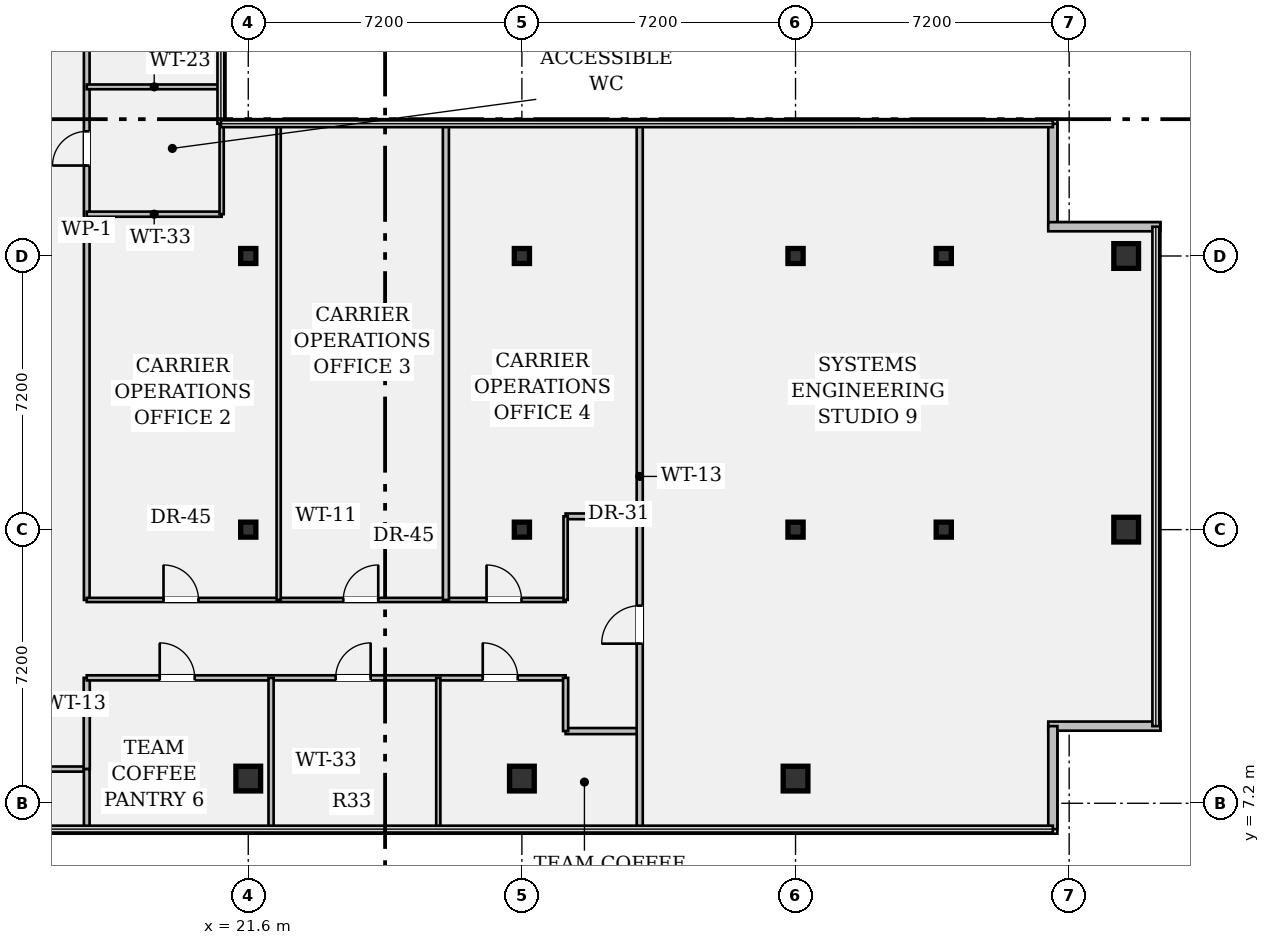
"""IFC4 building model, lengths in metres.
Left out: names, types, materials, properties, quantities, classifications, styles, units other than length and angle.
Written with IfcOpenShell. Run it as: python <this file> out.ifc"""

import sys

from ifc_helpers import new_model, si_unit, direction, frame, frame_2d, origin, origin_2d, place, context, subcontext, project, spatial, rectangle, hollow_rectangle, i_section, extrude, element, fill, save


model = new_model("IFC4")
c1 = context("Model", 3, precision=1e-05, world=origin(), true_north=direction((0.0, 1.0)))
c2 = subcontext(c1, "Body", "Model", "MODEL_VIEW")
j1 = project(units=[si_unit("LENGTHUNIT", "METRE"), si_unit("PLANEANGLEUNIT", "RADIAN")], contexts=[c1])
p1 = place(None, origin())
s1 = spatial("IfcSite", under=j1, at=p1, CompositionType="ELEMENT")
p2 = place(p1, origin())
s2 = spatial("IfcBuilding", under=s1, at=p2, CompositionType="ELEMENT")
p3 = place(p2, frame((0.0, 0.0, 286.65)))
s3 = spatial("IfcBuildingStorey", under=s2, at=p3, CompositionType="ELEMENT", Elevation=286.65)
p4 = place(p3, frame((21.6, 7.85, 0.0), z_axis=(0.0, 0.0, 1.0), x_axis=(1.0, 0.0, 0.0)))
e1 = element("IfcColumn", 1, at=p4, inside=s3, PredefinedType="COLUMN", context=c2, shape_type="SweptSolid", body=[
    extrude(hollow_rectangle(XDim=0.65, YDim=0.65, WallThickness=0.04, at=origin_2d()), origin(), (0.0, 0.0, 1.0), 3.24),
])
for number, where, z_axis, x_axis in (
    (2, (21.6, 14.4, 0.0), (0.0, 0.0, 1.0), (1.0, 0.0, 0.0)),
    (3, (21.6, 21.6, 0.0), (0.0, 0.0, 1.0), (1.0, 0.0, 0.0)),
):
    element("IfcColumn", number, at=place(p3, frame(where, z_axis=z_axis, x_axis=x_axis)), inside=s3, PredefinedType="COLUMN", context=c2, shape_type="SweptSolid", body=[
        extrude(i_section(OverallWidth=0.399, OverallDepth=0.394, WebThickness=0.023, FlangeThickness=0.037, FilletRadius=0.018, at=origin_2d()), origin(), (0.0, 0.0, 1.0), 3.24),
    ])
p5 = place(p3, frame((28.8, 7.85, 0.0), z_axis=(0.0, 0.0, 1.0), x_axis=(1.0, 0.0, 0.0)))
e4 = element("IfcColumn", 4, at=p5, inside=s3, PredefinedType="COLUMN", context=c2, shape_type="SweptSolid", body=[
    extrude(hollow_rectangle(XDim=0.65, YDim=0.65, WallThickness=0.04, at=origin_2d()), origin(), (0.0, 0.0, 1.0), 3.24),
])
for number, where, z_axis, x_axis in (
    (5, (28.8, 14.4, 0.0), (0.0, 0.0, 1.0), (1.0, 0.0, 0.0)),
    (6, (28.8, 21.6, 0.0), (0.0, 0.0, 1.0), (1.0, 0.0, 0.0)),
):
    element("IfcColumn", number, at=place(p3, frame(where, z_axis=z_axis, x_axis=x_axis)), inside=s3, PredefinedType="COLUMN", context=c2, shape_type="SweptSolid", body=[
        extrude(i_section(OverallWidth=0.399, OverallDepth=0.394, WebThickness=0.023, FlangeThickness=0.037, FilletRadius=0.018, at=origin_2d()), origin(), (0.0, 0.0, 1.0), 3.24),
    ])
p6 = place(p3, frame((36.0, 7.85, 0.0), z_axis=(0.0, 0.0, 1.0), x_axis=(1.0, 0.0, 0.0)))
e7 = element("IfcColumn", 7, at=p6, inside=s3, PredefinedType="COLUMN", context=c2, shape_type="SweptSolid", body=[
    extrude(hollow_rectangle(XDim=0.65, YDim=0.65, WallThickness=0.04, at=origin_2d()), origin(), (0.0, 0.0, 1.0), 3.24),
])
for number, where, z_axis, x_axis in (
    (8, (36.0, 14.4, 0.0), (0.0, 0.0, 1.0), (1.0, 0.0, 0.0)),
    (9, (36.0, 21.6, 0.0), (0.0, 0.0, 1.0), (1.0, 0.0, 0.0)),
    (10, (39.9, 14.4, 0.0), (0.0, 0.0, 1.0), (1.0, 0.0, 0.0)),
    (11, (39.9, 21.6, 0.0), (0.0, 0.0, 1.0), (1.0, 0.0, 0.0)),
):
    element("IfcColumn", number, at=place(p3, frame(where, z_axis=z_axis, x_axis=x_axis)), inside=s3, PredefinedType="COLUMN", context=c2, shape_type="SweptSolid", body=[
        extrude(i_section(OverallWidth=0.399, OverallDepth=0.394, WebThickness=0.023, FlangeThickness=0.037, FilletRadius=0.018, at=origin_2d()), origin(), (0.0, 0.0, 1.0), 3.24),
    ])
for number, where, z_axis, x_axis in (
    (12, (44.7, 14.4, 0.0), (0.0, 0.0, 1.0), (1.0, 0.0, 0.0)),
    (13, (44.7, 21.6, 0.0), (0.0, 0.0, 1.0), (1.0, 0.0, 0.0)),
):
    element("IfcColumn", number, at=place(p3, frame(where, z_axis=z_axis, x_axis=x_axis)), inside=s3, PredefinedType="COLUMN", context=c2, shape_type="SweptSolid", body=[
        extrude(hollow_rectangle(XDim=0.65, YDim=0.65, WallThickness=0.04, at=origin_2d()), origin(), (0.0, 0.0, 1.0), 3.24),
    ])
p7 = place(p3, frame((42.77, 25.08, 0.0), z_axis=(0.0, 0.0, 1.0), x_axis=(0.0, -1.0, 0.0)))
e14 = element("IfcWall", 14, at=p7, inside=s3, PredefinedType="STANDARD", context=c2, shape_type="SweptSolid", body=[
    extrude(rectangle(XDim=2.71, YDim=0.24, at=frame_2d((1.355, 0.0))), origin(), (0.0, 0.0, 1.0), 3.24),
])
for number, where, z_axis, x_axis in (
    (15, (42.65, 22.37, 0.0), (0.0, 0.0, 1.0), (1.0, 0.0, 0.0)),
    (16, (45.6, 9.23, 0.0), (0.0, 0.0, 1.0), (-1.0, 0.0, 0.0)),
):
    element("IfcWall", number, at=place(p3, frame(where, z_axis=z_axis, x_axis=x_axis)), inside=s3, PredefinedType="STANDARD", context=c2, shape_type="SweptSolid", body=[
        extrude(rectangle(XDim=2.95, YDim=0.24, at=frame_2d((1.475, 0.0))), origin(), (0.0, 0.0, 1.0), 3.24),
    ])
p8 = place(p3, frame((42.77, 9.23, 0.0), z_axis=(0.0, 0.0, 1.0), x_axis=(0.0, -1.0, 0.0)))
e17 = element("IfcWall", 17, at=p8, inside=s3, PredefinedType="STANDARD", context=c2, shape_type="SweptSolid", body=[
    extrude(rectangle(XDim=2.71, YDim=0.24, at=frame_2d((1.355, 0.0))), origin(), (0.0, 0.0, 1.0), 3.24),
])
p9 = place(p3, frame((14.4, 8.1, 0.0), z_axis=(0.0, 0.0, 1.0), x_axis=(1.0, 0.0, 0.0)))
e18 = element("IfcWall", 18, at=p9, inside=s3, PredefinedType="PARTITIONING", context=c2, shape_type="SweptSolid", body=[
    extrude(rectangle(XDim=2.95, YDim=0.135, at=frame_2d((1.475, 0.0))), origin(), (0.0, 0.0, 1.0), 3.24),
])
p10 = place(p9, frame((0.95, 0.0, 0.0)))
e19 = element("IfcOpeningElement", 19, at=p10, cuts=e18, PredefinedType="OPENING", context=c2, shape_type="SweptSolid", body=[
    extrude(rectangle(XDim=0.92, YDim=2.15, at=frame_2d((0.46, 1.075))), frame((0.0, 0.08, 0.0), z_axis=(0.0, -1.0, 0.0), x_axis=(1.0, 0.0, 0.0)), (0.0, 0.0, 1.0), 0.159),
])
p11 = place(p3, frame((17.35, 8.1, 0.0), z_axis=(0.0, 0.0, 1.0), x_axis=(0.0, 1.0, 0.0)))
e20 = element("IfcWall", 20, at=p11, inside=s3, PredefinedType="PARTITIONING", context=c2, shape_type="SweptSolid", body=[
    extrude(rectangle(XDim=2.4, YDim=0.16, at=frame_2d((1.2, 0.0))), origin(), (0.0, 0.0, 1.0), 3.24),
])
p12 = place(p3, frame((17.35, 12.55, 0.0), z_axis=(0.0, 0.0, 1.0), x_axis=(0.0, 1.0, 0.0)))
e21 = element("IfcWall", 21, at=p12, inside=s3, PredefinedType="PARTITIONING", context=c2, shape_type="SweptSolid", body=[
    extrude(rectangle(XDim=22.65, YDim=0.15, at=frame_2d((11.325, 0.0))), origin(), (0.0, 0.0, 1.0), 2.676),
])
p13 = place(p12, frame((11.43, 0.0, 0.0)))
e22 = element("IfcOpeningElement", 22, at=p13, cuts=e21, PredefinedType="OPENING", context=c2, shape_type="SweptSolid", body=[
    extrude(rectangle(XDim=0.9, YDim=2.15, at=frame_2d((0.45, 1.075))), frame((0.0, 0.087, 0.0), z_axis=(0.0, -1.0, 0.0), x_axis=(1.0, 0.0, 0.0)), (0.0, 0.0, 1.0), 0.174),
])
p14 = place(p12, frame((14.68, 0.0, 0.0)))
e23 = element("IfcOpeningElement", 23, at=p14, cuts=e21, PredefinedType="OPENING", context=c2, shape_type="SweptSolid", body=[
    extrude(rectangle(XDim=0.9, YDim=2.15, at=frame_2d((0.45, 1.075))), frame((0.0, 0.087, 0.0), z_axis=(0.0, -1.0, 0.0), x_axis=(1.0, 0.0, 0.0)), (0.0, 0.0, 1.0), 0.174),
])
p15 = place(p12, frame((17.93, 0.0, 0.0)))
e24 = element("IfcOpeningElement", 24, at=p15, cuts=e21, PredefinedType="OPENING", context=c2, shape_type="SweptSolid", body=[
    extrude(rectangle(XDim=0.9, YDim=2.15, at=frame_2d((0.45, 1.075))), frame((0.0, 0.087, 0.0), z_axis=(0.0, -1.0, 0.0), x_axis=(1.0, 0.0, 0.0)), (0.0, 0.0, 1.0), 0.174),
])
p16 = place(p12, frame((21.17, 0.0, 0.0)))
e25 = element("IfcOpeningElement", 25, at=p16, cuts=e21, PredefinedType="OPENING", context=c2, shape_type="SweptSolid", body=[
    extrude(rectangle(XDim=0.9, YDim=2.15, at=frame_2d((0.45, 1.075))), frame((0.0, 0.087, 0.0), z_axis=(0.0, -1.0, 0.0), x_axis=(1.0, 0.0, 0.0)), (0.0, 0.0, 1.0), 0.174),
])
p17 = place(p3, frame((17.35, 10.5, 0.0), z_axis=(0.0, 0.0, 1.0), x_axis=(1.0, 0.0, 0.0)))
e26 = element("IfcWall", 26, at=p17, inside=s3, PredefinedType="PARTITIONING", context=c2, shape_type="SweptSolid", body=[
    extrude(rectangle(XDim=12.6, YDim=0.135, at=frame_2d((6.3, 0.0))), origin(), (0.0, 0.0, 1.0), 2.676),
])
p18 = place(p17, frame((1.92, 0.0, 0.0)))
e27 = element("IfcOpeningElement", 27, at=p18, cuts=e26, PredefinedType="OPENING", context=c2, shape_type="SweptSolid", body=[
    extrude(rectangle(XDim=0.92, YDim=2.15, at=frame_2d((0.46, 1.075))), frame((0.0, 0.08, 0.0), z_axis=(0.0, -1.0, 0.0), x_axis=(1.0, 0.0, 0.0)), (0.0, 0.0, 1.0), 0.159),
])
p19 = place(p17, frame((6.55, 0.0, 0.0)))
e28 = element("IfcOpeningElement", 28, at=p19, cuts=e26, PredefinedType="OPENING", context=c2, shape_type="SweptSolid", body=[
    extrude(rectangle(XDim=0.92, YDim=2.15, at=frame_2d((0.46, 1.075))), frame((0.0, 0.08, 0.0), z_axis=(0.0, -1.0, 0.0), x_axis=(1.0, 0.0, 0.0)), (0.0, 0.0, 1.0), 0.159),
])
p20 = place(p17, frame((10.42, 0.0, 0.0)))
e29 = element("IfcOpeningElement", 29, at=p20, cuts=e26, PredefinedType="OPENING", context=c2, shape_type="SweptSolid", body=[
    extrude(rectangle(XDim=0.92, YDim=2.15, at=frame_2d((0.46, 1.075))), frame((0.0, 0.08, 0.0), z_axis=(0.0, -1.0, 0.0), x_axis=(1.0, 0.0, 0.0)), (0.0, 0.0, 1.0), 0.159),
])
p21 = place(p3, frame((17.35, 12.55, 0.0), z_axis=(0.0, 0.0, 1.0), x_axis=(1.0, 0.0, 0.0)))
e30 = element("IfcWall", 30, at=p21, inside=s3, PredefinedType="PARTITIONING", context=c2, shape_type="SweptSolid", body=[
    extrude(rectangle(XDim=12.6, YDim=0.11, at=frame_2d((6.3, 0.0))), origin(), (0.0, 0.0, 1.0), 2.676),
])
p22 = place(p21, frame((2.02, 0.0, 0.0)))
e31 = element("IfcOpeningElement", 31, at=p22, cuts=e30, PredefinedType="OPENING", context=c2, shape_type="SweptSolid", body=[
    extrude(rectangle(XDim=0.92, YDim=2.15, at=frame_2d((0.46, 1.075))), frame((0.0, 0.067, 0.0), z_axis=(0.0, -1.0, 0.0), x_axis=(1.0, 0.0, 0.0)), (0.0, 0.0, 1.0), 0.134),
])
p23 = place(p21, frame((6.75, 0.0, 0.0)))
e32 = element("IfcOpeningElement", 32, at=p23, cuts=e30, PredefinedType="OPENING", context=c2, shape_type="SweptSolid", body=[
    extrude(rectangle(XDim=0.92, YDim=2.15, at=frame_2d((0.46, 1.075))), frame((0.0, 0.067, 0.0), z_axis=(0.0, -1.0, 0.0), x_axis=(1.0, 0.0, 0.0)), (0.0, 0.0, 1.0), 0.134),
])
p24 = place(p21, frame((10.52, 0.0, 0.0)))
e33 = element("IfcOpeningElement", 33, at=p24, cuts=e30, PredefinedType="OPENING", context=c2, shape_type="SweptSolid", body=[
    extrude(rectangle(XDim=0.92, YDim=2.15, at=frame_2d((0.46, 1.075))), frame((0.0, 0.067, 0.0), z_axis=(0.0, -1.0, 0.0), x_axis=(1.0, 0.0, 0.0)), (0.0, 0.0, 1.0), 0.134),
])
p25 = place(p3, frame((29.95, 9.1, 0.0), z_axis=(0.0, 0.0, 1.0), x_axis=(1.0, 0.0, 0.0)))
e34 = element("IfcWall", 34, at=p25, inside=s3, PredefinedType="PARTITIONING", context=c2, shape_type="SweptSolid", body=[
    extrude(rectangle(XDim=1.95, YDim=0.16, at=frame_2d((0.975, 0.0))), origin(), (0.0, 0.0, 1.0), 2.808),
])
p26 = place(p3, frame((29.95, 14.75, 0.0), z_axis=(0.0, 0.0, 1.0), x_axis=(1.0, 0.0, 0.0)))
e35 = element("IfcWall", 35, at=p26, inside=s3, PredefinedType="PARTITIONING", context=c2, shape_type="SweptSolid", body=[
    extrude(rectangle(XDim=1.95, YDim=0.15, at=frame_2d((0.975, 0.0))), origin(), (0.0, 0.0, 1.0), 2.808),
])
p27 = place(p3, frame((29.95, 9.1, 0.0), z_axis=(0.0, 0.0, 1.0), x_axis=(0.0, 1.0, 0.0)))
e36 = element("IfcWall", 36, at=p27, inside=s3, PredefinedType="PARTITIONING", context=c2, shape_type="SweptSolid", body=[
    extrude(rectangle(XDim=1.4, YDim=0.135, at=frame_2d((0.7, 0.0))), origin(), (0.0, 0.0, 1.0), 3.24),
])
p28 = place(p3, frame((29.95, 12.55, 0.0), z_axis=(0.0, 0.0, 1.0), x_axis=(0.0, 1.0, 0.0)))
e37 = element("IfcWall", 37, at=p28, inside=s3, PredefinedType="PARTITIONING", context=c2, shape_type="SweptSolid", body=[
    extrude(rectangle(XDim=2.2, YDim=0.11, at=frame_2d((1.1, 0.0))), origin(), (0.0, 0.0, 1.0), 2.676),
])
p29 = place(p3, frame((31.9, 6.52, 0.0), z_axis=(0.0, 0.0, 1.0), x_axis=(0.0, 1.0, 0.0)))
e38 = element("IfcWall", 38, at=p29, inside=s3, PredefinedType="PARTITIONING", context=c2, shape_type="SweptSolid", body=[
    extrude(rectangle(XDim=18.56, YDim=0.16, at=frame_2d((9.28, 0.0))), origin(), (0.0, 0.0, 1.0), 2.676),
])
p30 = place(p29, frame((4.88, 0.0, 0.0)))
e39 = element("IfcOpeningElement", 39, at=p30, cuts=e38, PredefinedType="OPENING", context=c2, shape_type="SweptSolid", body=[
    extrude(rectangle(XDim=1.0, YDim=2.15, at=frame_2d((0.5, 1.075))), frame((0.0, 0.092, 0.0), z_axis=(0.0, -1.0, 0.0), x_axis=(1.0, 0.0, 0.0)), (0.0, 0.0, 1.0), 0.184),
])
p31 = place(p3, frame((17.35, 22.7, 0.0), z_axis=(0.0, 0.0, 1.0), x_axis=(1.0, 0.0, 0.0)))
e40 = element("IfcWall", 40, at=p31, inside=s3, PredefinedType="PARTITIONING", context=c2, shape_type="SweptSolid", body=[
    extrude(rectangle(XDim=3.55, YDim=0.135, at=frame_2d((1.775, 0.0))), origin(), (0.0, 0.0, 1.0), 2.808),
])
p32 = place(p3, frame((20.9, 22.7, 0.0), z_axis=(0.0, 0.0, 1.0), x_axis=(0.0, 1.0, 0.0)))
e41 = element("IfcWall", 41, at=p32, inside=s3, PredefinedType="PARTITIONING", context=c2, shape_type="SweptSolid", body=[
    extrude(rectangle(XDim=12.5, YDim=0.11, at=frame_2d((6.25, 0.0))), origin(), (0.0, 0.0, 1.0), 3.24),
])
p33 = place(p3, frame((17.35, 26.05, 0.0), z_axis=(0.0, 0.0, 1.0), x_axis=(1.0, 0.0, 0.0)))
e42 = element("IfcWall", 42, at=p33, inside=s3, PredefinedType="PARTITIONING", context=c2, shape_type="SweptSolid", body=[
    extrude(rectangle(XDim=3.55, YDim=0.125, at=frame_2d((1.775, 0.0))), origin(), (0.0, 0.0, 1.0), 2.808),
])
p34 = place(p3, frame((22.4, 12.55, 0.0), z_axis=(0.0, 0.0, 1.0), x_axis=(0.0, 1.0, 0.0)))
e43 = element("IfcWall", 43, at=p34, inside=s3, PredefinedType="PARTITIONING", context=c2, shape_type="SweptSolid", body=[
    extrude(rectangle(XDim=12.5, YDim=0.11, at=frame_2d((6.25, 0.0))), origin(), (0.0, 0.0, 1.0), 2.676),
])
p35 = place(p3, frame((26.8, 12.55, 0.0), z_axis=(0.0, 0.0, 1.0), x_axis=(0.0, 1.0, 0.0)))
e44 = element("IfcWall", 44, at=p35, inside=s3, PredefinedType="PARTITIONING", context=c2, shape_type="SweptSolid", body=[
    extrude(rectangle(XDim=12.5, YDim=0.16, at=frame_2d((6.25, 0.0))), origin(), (0.0, 0.0, 1.0), 2.676),
])
p36 = place(p3, frame((17.35, 6.52, 0.0), z_axis=(0.0, 0.0, 1.0), x_axis=(0.0, 1.0, 0.0)))
e45 = element("IfcWall", 45, at=p36, inside=s3, PredefinedType="PARTITIONING", context=c2, shape_type="SweptSolid", body=[
    extrude(rectangle(XDim=1.58, YDim=0.15, at=frame_2d((0.79, 0.0))), origin(), (0.0, 0.0, 1.0), 3.24),
])
p37 = place(p3, frame((22.2, 6.52, 0.0), z_axis=(0.0, 0.0, 1.0), x_axis=(0.0, 1.0, 0.0)))
e46 = element("IfcWall", 46, at=p37, inside=s3, PredefinedType="PARTITIONING", context=c2, shape_type="SweptSolid", body=[
    extrude(rectangle(XDim=3.98, YDim=0.135, at=frame_2d((1.99, 0.0))), origin(), (0.0, 0.0, 1.0), 2.676),
])
p38 = place(p3, frame((26.6, 6.52, 0.0), z_axis=(0.0, 0.0, 1.0), x_axis=(0.0, 1.0, 0.0)))
e47 = element("IfcWall", 47, at=p38, inside=s3, PredefinedType="PARTITIONING", context=c2, shape_type="SweptSolid", body=[
    extrude(rectangle(XDim=3.98, YDim=0.11, at=frame_2d((1.99, 0.0))), origin(), (0.0, 0.0, 1.0), 2.676),
])
p39 = place(p13, origin())
e48 = element("IfcDoor", 48, at=p39, inside=s3, OperationType="SINGLE_SWING_LEFT", PredefinedType="DOOR", context=c2, shape_type="SweptSolid", body=[
    extrude(rectangle(XDim=0.9, YDim=2.15, at=frame_2d((0.45, 1.075))), frame((0.0, 0.025, 0.0), z_axis=(0.0, -1.0, 0.0), x_axis=(1.0, 0.0, 0.0)), (0.0, 0.0, 1.0), 0.05),
])
fill(e22, e48)
p40 = place(p22, origin())
e49 = element("IfcDoor", 49, at=p40, inside=s3, OperationType="SINGLE_SWING_LEFT", PredefinedType="DOOR", context=c2, shape_type="SweptSolid", body=[
    extrude(rectangle(XDim=0.92, YDim=2.15, at=frame_2d((0.46, 1.075))), frame((0.0, 0.025, 0.0), z_axis=(0.0, -1.0, 0.0), x_axis=(1.0, 0.0, 0.0)), (0.0, 0.0, 1.0), 0.05),
])
fill(e31, e49)
p41 = place(p23, origin())
e50 = element("IfcDoor", 50, at=p41, inside=s3, OperationType="SINGLE_SWING_RIGHT", PredefinedType="DOOR", context=c2, shape_type="SweptSolid", body=[
    extrude(rectangle(XDim=0.92, YDim=2.15, at=frame_2d((0.46, 1.075))), frame((0.0, 0.025, 0.0), z_axis=(0.0, -1.0, 0.0), x_axis=(1.0, 0.0, 0.0)), (0.0, 0.0, 1.0), 0.05),
])
fill(e32, e50)
p42 = place(p24, origin())
e51 = element("IfcDoor", 51, at=p42, inside=s3, OperationType="SINGLE_SWING_LEFT", PredefinedType="DOOR", context=c2, shape_type="SweptSolid", body=[
    extrude(rectangle(XDim=0.92, YDim=2.15, at=frame_2d((0.46, 1.075))), frame((0.0, 0.025, 0.0), z_axis=(0.0, -1.0, 0.0), x_axis=(1.0, 0.0, 0.0)), (0.0, 0.0, 1.0), 0.05),
])
fill(e33, e51)
p43 = place(p18, origin())
e52 = element("IfcDoor", 52, at=p43, inside=s3, OperationType="SINGLE_SWING_LEFT", PredefinedType="DOOR", context=c2, shape_type="SweptSolid", body=[
    extrude(rectangle(XDim=0.92, YDim=2.15, at=frame_2d((0.46, 1.075))), frame((0.0, 0.025, 0.0), z_axis=(0.0, -1.0, 0.0), x_axis=(1.0, 0.0, 0.0)), (0.0, 0.0, 1.0), 0.05),
])
fill(e27, e52)
p44 = place(p19, origin())
e53 = element("IfcDoor", 53, at=p44, inside=s3, OperationType="SINGLE_SWING_RIGHT", PredefinedType="DOOR", context=c2, shape_type="SweptSolid", body=[
    extrude(rectangle(XDim=0.92, YDim=2.15, at=frame_2d((0.46, 1.075))), frame((0.0, 0.025, 0.0), z_axis=(0.0, -1.0, 0.0), x_axis=(1.0, 0.0, 0.0)), (0.0, 0.0, 1.0), 0.05),
])
fill(e28, e53)
p45 = place(p20, origin())
e54 = element("IfcDoor", 54, at=p45, inside=s3, OperationType="SINGLE_SWING_LEFT", PredefinedType="DOOR", context=c2, shape_type="SweptSolid", body=[
    extrude(rectangle(XDim=0.92, YDim=2.15, at=frame_2d((0.46, 1.075))), frame((0.0, 0.025, 0.0), z_axis=(0.0, -1.0, 0.0), x_axis=(1.0, 0.0, 0.0)), (0.0, 0.0, 1.0), 0.05),
])
fill(e29, e54)
p46 = place(p30, origin())
e55 = element("IfcDoor", 55, at=p46, inside=s3, OperationType="SINGLE_SWING_LEFT", PredefinedType="DOOR", context=c2, shape_type="SweptSolid", body=[
    extrude(rectangle(XDim=1.0, YDim=2.15, at=frame_2d((0.5, 1.075))), frame((0.0, 0.025, 0.0), z_axis=(0.0, -1.0, 0.0), x_axis=(1.0, 0.0, 0.0)), (0.0, 0.0, 1.0), 0.05),
])
fill(e39, e55)
save(model, sys.argv[1])
